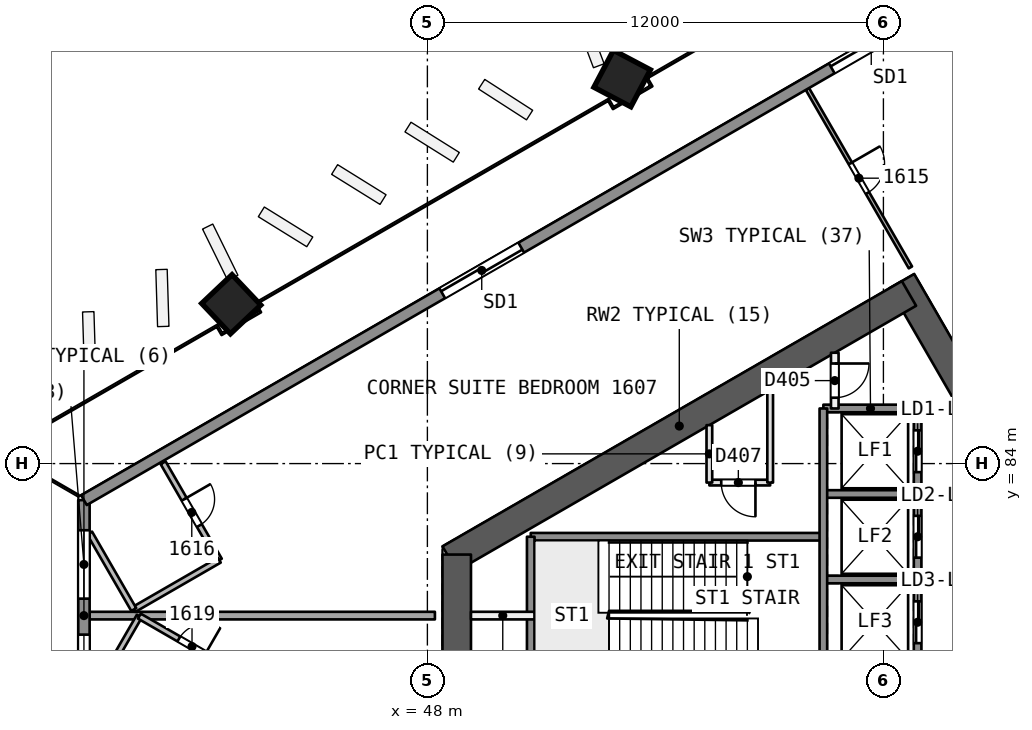
"""IFC4 building model, lengths in metres.
Left out: names, types, materials, properties, quantities, classifications, styles, units other than length and angle.
Written with IfcOpenShell. Run it as: python <this file> out.ifc"""

import sys

from ifc_helpers import new_model, si_unit, direction, frame, frame_2d, origin, origin_2d, place, context, subcontext, project, spatial, rectangle, extrude, element, fill, save


model = new_model("IFC4")
c1 = context("Model", 3, precision=1e-05, world=origin(), true_north=direction((0.0, 1.0)))
c2 = subcontext(c1, "Body", "Model", "MODEL_VIEW")
j1 = project(units=[si_unit("LENGTHUNIT", "METRE"), si_unit("PLANEANGLEUNIT", "RADIAN")], contexts=[c1])
p1 = place(None, origin())
s1 = spatial("IfcSite", under=j1, at=p1, CompositionType="ELEMENT")
p2 = place(p1, origin())
s2 = spatial("IfcBuilding", under=s1, at=p2, CompositionType="ELEMENT")
p3 = place(p2, frame((0.0, 0.0, 72.1)))
s3 = spatial("IfcBuildingStorey", under=s2, at=p3, CompositionType="ELEMENT", Elevation=72.1)
p4 = place(p3, frame((65.567, 80.0, 0.0), z_axis=(0.0, 0.0, 1.0), x_axis=(-0.499988615364, 0.866031976607, 0.0)))
e1 = element("IfcWall", 1, at=p4, inside=s3, PredefinedType="SHEAR", context=c2, shape_type="SweptSolid", body=[
    extrude(rectangle(XDim=10.163, YDim=0.75, at=frame_2d((5.082, 0.0))), origin(), (0.0, 0.0, 1.0), 3.7),
])
p5 = place(p4, frame((0.733, 0.0, 0.0)))
e2 = element("IfcOpeningElement", 2, at=p5, cuts=e1, PredefinedType="OPENING", context=c2, shape_type="SweptSolid", body=[
    extrude(rectangle(XDim=1.2, YDim=2.1, at=frame_2d((0.6, 1.05))), frame((0.0, 0.385, 0.0), z_axis=(0.0, -1.0, 0.0), x_axis=(1.0, 0.0, 0.0)), (0.0, 0.0, 1.0), 0.771),
])
p6 = place(p3, frame((60.673, 88.477, 0.0), z_axis=(0.0, 0.0, 1.0), x_axis=(-0.8660248072, -0.500001033313, 0.0)))
e3 = element("IfcWall", 3, at=p6, inside=s3, PredefinedType="SHEAR", context=c2, shape_type="SweptSolid", body=[
    extrude(rectangle(XDim=13.958, YDim=0.75, at=frame_2d((6.979, 0.0))), origin(), (0.0, 0.0, 1.0), 3.7),
])
p7 = place(p3, frame((48.772, 81.606, 0.0), z_axis=(0.0, 0.0, 1.0), x_axis=(0.0, -1.0, 0.0)))
e4 = element("IfcWall", 4, at=p7, inside=s3, PredefinedType="SHEAR", context=c2, shape_type="SweptSolid", body=[
    extrude(rectangle(XDim=3.429, YDim=0.75, at=frame_2d((1.714, 0.0))), origin(), (0.0, 0.0, 1.0), 3.7),
])
p8 = place(p3, frame((60.673, 71.523, 0.0), z_axis=(0.0, 0.0, 1.0), x_axis=(0.499997052475, 0.866027105532, 0.0)))
e5 = element("IfcWall", 5, at=p8, inside=s3, PredefinedType="SHEAR", context=c2, shape_type="SweptSolid", body=[
    extrude(rectangle(XDim=10.005, YDim=0.75, at=frame_2d((5.002, 0.0))), origin(), (0.0, 0.0, 1.0), 3.7),
])
p9 = place(p8, frame((7.855, 0.0, 0.0)))
e6 = element("IfcOpeningElement", 6, at=p9, cuts=e5, PredefinedType="OPENING", context=c2, shape_type="SweptSolid", body=[
    extrude(rectangle(XDim=1.2, YDim=2.1, at=frame_2d((0.6, 1.05))), frame((0.0, 0.385, 0.0), z_axis=(0.0, -1.0, 0.0), x_axis=(1.0, 0.0, 0.0)), (0.0, 0.0, 1.0), 0.771),
])
p10 = place(p3, frame((53.102, 94.146, 0.0), z_axis=(0.019328516974, -0.012138044789, 0.999739504221), x_axis=(-0.500208848309, 0.865669585777, 0.020181088508)))
e7 = element("IfcColumn", 7, at=p10, inside=s3, PredefinedType="COLUMN", context=c2, shape_type="SweptSolid", body=[
    extrude(rectangle(XDim=1.1, YDim=1.1, at=origin_2d()), origin(), (0.0, 0.0, 1.0), 3.701),
])
p11 = place(p3, frame((42.804, 88.201, 0.0), z_axis=(0.02855911485, -0.006793507689, 0.999569019734), x_axis=(-0.500407643461, 0.865554709988, 0.020180049142)))
e8 = element("IfcColumn", 8, at=p11, inside=s3, PredefinedType="COLUMN", context=c2, shape_type="SweptSolid", body=[
    extrude(rectangle(XDim=1.1, YDim=1.1, at=origin_2d()), origin(), (0.0, 0.0, 1.0), 3.702),
])
p12 = place(p3, frame((61.51, 95.884, 0.0), z_axis=(0.0, 0.0, 1.0), x_axis=(0.499993171696, -0.866029346071, 0.0)))
e9 = element("IfcWall", 9, at=p12, inside=s3, PredefinedType="PARTITIONING", context=c2, shape_type="SweptSolid", body=[
    extrude(rectangle(XDim=13.401, YDim=0.2, at=frame_2d((6.701, 0.0))), origin(), (0.0, 0.0, 1.0), 3.2),
])
p13 = place(p3, frame((58.0, 93.857, 0.0), z_axis=(0.0, 0.0, 1.0), x_axis=(0.499974500895, -0.866040125199, 0.0)))
e10 = element("IfcWall", 10, at=p13, inside=s3, PredefinedType="PARTITIONING", context=c2, shape_type="SweptSolid", body=[
    extrude(rectangle(XDim=5.422, YDim=0.1, at=frame_2d((2.711, 0.0))), origin(), (0.0, 0.0, 1.0), 3.2),
])
p14 = place(p13, frame((2.261, 0.0, 0.0)))
e11 = element("IfcOpeningElement", 11, at=p14, cuts=e10, PredefinedType="OPENING", context=c2, shape_type="SweptSolid", body=[
    extrude(rectangle(XDim=0.9, YDim=2.1, at=frame_2d((0.45, 1.05))), frame((0.0, 0.061, 0.0), z_axis=(0.0, -1.0, 0.0), x_axis=(1.0, 0.0, 0.0)), (0.0, 0.0, 1.0), 0.121),
])
p15 = place(p3, frame((41.046, 84.022, 0.0), z_axis=(0.0, 0.0, 1.0), x_axis=(0.500017718492, -0.866015173767, 0.0)))
e12 = element("IfcWall", 12, at=p15, inside=s3, PredefinedType="PARTITIONING", context=c2, shape_type="SweptSolid", body=[
    extrude(rectangle(XDim=2.958, YDim=0.15, at=frame_2d((1.479, 0.0))), origin(), (0.0, 0.0, 1.0), 3.2),
])
p16 = place(p15, frame((1.108, 0.0, 0.0)))
e13 = element("IfcOpeningElement", 13, at=p16, cuts=e12, PredefinedType="OPENING", context=c2, shape_type="SweptSolid", body=[
    extrude(rectangle(XDim=0.8, YDim=2.1, at=frame_2d((0.4, 1.05))), frame((0.0, 0.085, 0.0), z_axis=(0.0, -1.0, 0.0), x_axis=(1.0, 0.0, 0.0)), (0.0, 0.0, 1.0), 0.171),
])
p17 = place(p3, frame((42.525, 81.46, 0.0), z_axis=(0.0, 0.0, 1.0), x_axis=(-0.866021400173, -0.500006934395, 0.0)))
e14 = element("IfcWall", 14, at=p17, inside=s3, PredefinedType="PARTITIONING", context=c2, shape_type="SweptSolid", body=[
    extrude(rectangle(XDim=2.6, YDim=0.15, at=frame_2d((1.3, 0.0))), origin(), (0.0, 0.0, 1.0), 3.2),
])
p18 = place(p3, frame((40.273, 80.16, 0.0), z_axis=(0.0, 0.0, 1.0), x_axis=(-0.500013365158, 0.86601768727, 0.0)))
e15 = element("IfcWall", 15, at=p18, inside=s3, PredefinedType="PARTITIONING", context=c2, shape_type="SweptSolid", body=[
    extrude(rectangle(XDim=2.325, YDim=0.15, at=frame_2d((1.162, 0.0))), origin(), (0.0, 0.0, 1.0), 3.2),
])
p19 = place(p3, frame((39.111, 80.0, 0.0), z_axis=(0.0, 0.0, 1.0), x_axis=(1.0, 0.0, 0.0)))
e16 = element("IfcWall", 16, at=p19, inside=s3, PredefinedType="PARTITIONING", context=c2, shape_type="SweptSolid", body=[
    extrude(rectangle(XDim=9.087, YDim=0.2, at=frame_2d((4.543, 0.0))), origin(), (0.0, 0.0, 1.0), 3.2),
])
p20 = place(p3, frame((39.111, 77.718, 0.0), z_axis=(0.0, 0.0, 1.0), x_axis=(0.500058625179, 0.865991553875, 0.0)))
e17 = element("IfcWall", 17, at=p20, inside=s3, PredefinedType="PARTITIONING", context=c2, shape_type="SweptSolid", body=[
    extrude(rectangle(XDim=2.619, YDim=0.15, at=frame_2d((1.31, 0.0))), origin(), (0.0, 0.0, 1.0), 3.2),
])
p21 = place(p3, frame((40.421, 79.986, 0.0), z_axis=(0.0, 0.0, 1.0), x_axis=(0.86603858612, -0.49997716683, 0.0)))
e18 = element("IfcWall", 18, at=p21, inside=s3, PredefinedType="PARTITIONING", context=c2, shape_type="SweptSolid", body=[
    extrude(rectangle(XDim=2.6, YDim=0.15, at=frame_2d((1.3, 0.0))), origin(), (0.0, 0.0, 1.0), 3.2),
])
p22 = place(p21, frame((1.2, 0.0, 0.0)))
e19 = element("IfcOpeningElement", 19, at=p22, cuts=e18, PredefinedType="OPENING", context=c2, shape_type="SweptSolid", body=[
    extrude(rectangle(XDim=0.8, YDim=2.1, at=frame_2d((0.4, 1.05))), frame((0.0, 0.085, 0.0), z_axis=(0.0, -1.0, 0.0), x_axis=(1.0, 0.0, 0.0)), (0.0, 0.0, 1.0), 0.171),
])
p23 = place(p3, frame((38.962, 76.962, 0.0), z_axis=(0.0, 0.0, 1.0), x_axis=(0.0, 1.0, 0.0)))
e20 = element("IfcWall", 20, at=p23, inside=s3, PredefinedType="SOLIDWALL", context=c2, shape_type="SweptSolid", body=[
    extrude(rectangle(XDim=6.076, YDim=0.3, at=frame_2d((3.038, 0.0))), origin(), (0.0, 0.0, 1.0), 3.2),
])
p24 = place(p23, frame((3.484, 0.0, 0.9)))
e21 = element("IfcOpeningElement", 21, at=p24, cuts=e20, PredefinedType="OPENING", context=c2, shape_type="SweptSolid", body=[
    extrude(rectangle(XDim=1.8, YDim=1.5, at=frame_2d((0.9, 0.75))), frame((0.0, 0.161, 0.0), z_axis=(0.0, -1.0, 0.0), x_axis=(1.0, 0.0, 0.0)), (0.0, 0.0, 1.0), 0.321),
])
p25 = place(p23, frame((0.738, 0.0, 0.9)))
e22 = element("IfcOpeningElement", 22, at=p25, cuts=e20, PredefinedType="OPENING", context=c2, shape_type="SweptSolid", body=[
    extrude(rectangle(XDim=1.8, YDim=1.5, at=frame_2d((0.9, 0.75))), frame((0.0, 0.161, 0.0), z_axis=(0.0, -1.0, 0.0), x_axis=(1.0, 0.0, 0.0)), (0.0, 0.0, 1.0), 0.321),
])
p26 = place(p3, frame((38.962, 83.038, 0.0), z_axis=(0.0, 0.0, 1.0), x_axis=(0.866024483997, 0.500001593116, 0.0)))
e23 = element("IfcWall", 23, at=p26, inside=s3, PredefinedType="SOLIDWALL", context=c2, shape_type="SweptSolid", body=[
    extrude(rectangle(XDim=59.381, YDim=0.3, at=frame_2d((29.69, 0.0))), origin(), (0.0, 0.0, 1.0), 3.2),
])
p27 = place(p26, frame((27.399, 0.0, 0.0)))
e24 = element("IfcOpeningElement", 24, at=p27, cuts=e23, PredefinedType="OPENING", context=c2, shape_type="SweptSolid", body=[
    extrude(rectangle(XDim=2.4, YDim=2.4, at=frame_2d((1.2, 1.2))), frame((0.0, 0.161, 0.0), z_axis=(0.0, -1.0, 0.0), x_axis=(1.0, 0.0, 0.0)), (0.0, 0.0, 1.0), 0.321),
])
p28 = place(p26, frame((22.723, 0.0, 0.0)))
e25 = element("IfcOpeningElement", 25, at=p28, cuts=e23, PredefinedType="OPENING", context=c2, shape_type="SweptSolid", body=[
    extrude(rectangle(XDim=2.4, YDim=2.4, at=frame_2d((1.2, 1.2))), frame((0.0, 0.161, 0.0), z_axis=(0.0, -1.0, 0.0), x_axis=(1.0, 0.0, 0.0)), (0.0, 0.0, 1.0), 0.321),
])
p29 = place(p26, frame((10.887, 0.0, 0.0)))
e26 = element("IfcOpeningElement", 26, at=p29, cuts=e23, PredefinedType="OPENING", context=c2, shape_type="SweptSolid", body=[
    extrude(rectangle(XDim=2.4, YDim=2.4, at=frame_2d((1.2, 1.2))), frame((0.0, 0.161, 0.0), z_axis=(0.0, -1.0, 0.0), x_axis=(1.0, 0.0, 0.0)), (0.0, 0.0, 1.0), 0.321),
])
p30 = place(p26, frame((44.158, 0.0, 0.0)))
e27 = element("IfcOpeningElement", 27, at=p30, cuts=e23, PredefinedType="OPENING", context=c2, shape_type="SweptSolid", body=[
    extrude(rectangle(XDim=2.4, YDim=2.4, at=frame_2d((1.2, 1.2))), frame((0.0, 0.161, 0.0), z_axis=(0.0, -1.0, 0.0), x_axis=(1.0, 0.0, 0.0)), (0.0, 0.0, 1.0), 0.321),
])
p31 = place(p3, frame((60.9, 85.45, 0.0), z_axis=(0.0, 0.0, 1.0), x_axis=(-1.0, 0.0, 0.0)))
e28 = element("IfcWall", 28, at=p31, inside=s3, PredefinedType="SOLIDWALL", context=c2, shape_type="SweptSolid", body=[
    extrude(rectangle(XDim=2.48, YDim=0.2, at=frame_2d((1.24, 0.0))), origin(), (0.0, 0.0, 1.0), 3.2),
])
p32 = place(p3, frame((57.02, 83.5, 0.0), z_axis=(0.0, 0.0, 1.0), x_axis=(-1.0, 0.0, 0.0)))
e29 = element("IfcWall", 29, at=p32, inside=s3, PredefinedType="PARTITIONING", context=c2, shape_type="SweptSolid", body=[
    extrude(rectangle(XDim=1.6, YDim=0.15, at=frame_2d((0.8, 0.0))), origin(), (0.0, 0.0, 1.0), 3.2),
])
p33 = place(p32, frame((0.387, 0.0, 0.0)))
e30 = element("IfcOpeningElement", 30, at=p33, cuts=e29, PredefinedType="OPENING", context=c2, shape_type="SweptSolid", body=[
    extrude(rectangle(XDim=0.9, YDim=2.1, at=frame_2d((0.45, 1.05))), frame((0.0, 0.085, 0.0), z_axis=(0.0, -1.0, 0.0), x_axis=(1.0, 0.0, 0.0)), (0.0, 0.0, 1.0), 0.171),
])
p34 = place(p3, frame((60.9, 83.2, 0.0), z_axis=(0.0, 0.0, 1.0), x_axis=(-1.0, 0.0, 0.0)))
e31 = element("IfcWall", 31, at=p34, inside=s3, PredefinedType="SOLIDWALL", context=c2, shape_type="SweptSolid", body=[
    extrude(rectangle(XDim=2.48, YDim=0.2, at=frame_2d((1.24, 0.0))), origin(), (0.0, 0.0, 1.0), 3.2),
])
p35 = place(p3, frame((58.42, 82.075, 0.0), z_axis=(0.0, 0.0, 1.0), x_axis=(-1.0, 0.0, 0.0)))
e32 = element("IfcWall", 32, at=p35, inside=s3, PredefinedType="SOLIDWALL", context=c2, shape_type="SweptSolid", body=[
    extrude(rectangle(XDim=7.7, YDim=0.2, at=frame_2d((3.85, 0.0))), origin(), (0.0, 0.0, 1.0), 3.2),
])
p36 = place(p3, frame((60.9, 80.95, 0.0), z_axis=(0.0, 0.0, 1.0), x_axis=(-1.0, 0.0, 0.0)))
e33 = element("IfcWall", 33, at=p36, inside=s3, PredefinedType="SOLIDWALL", context=c2, shape_type="SweptSolid", body=[
    extrude(rectangle(XDim=2.48, YDim=0.2, at=frame_2d((1.24, 0.0))), origin(), (0.0, 0.0, 1.0), 3.2),
])
p37 = place(p3, frame((50.82, 80.0, 0.0), z_axis=(0.0, 0.0, 1.0), x_axis=(-1.0, 0.0, 0.0)))
e34 = element("IfcWall", 34, at=p37, inside=s3, PredefinedType="PARTITIONING", context=c2, shape_type="SweptSolid", body=[
    extrude(rectangle(XDim=1.673, YDim=0.2, at=frame_2d((0.836, 0.0))), origin(), (0.0, 0.0, 1.0), 3.2),
])
p38 = place(p3, frame((60.9, 85.45, 0.0), z_axis=(0.0, 0.0, 1.0), x_axis=(0.0, -1.0, 0.0)))
e35 = element("IfcWall", 35, at=p38, inside=s3, PredefinedType="SOLIDWALL", context=c2, shape_type="SweptSolid", body=[
    extrude(rectangle(XDim=10.9, YDim=0.2, at=frame_2d((5.45, 0.0))), origin(), (0.0, 0.0, 1.0), 3.2),
])
p39 = place(p38, frame((0.575, 0.0, 0.0)))
e36 = element("IfcOpeningElement", 36, at=p39, cuts=e35, PredefinedType="OPENING", context=c2, shape_type="SweptSolid", body=[
    extrude(rectangle(XDim=1.1, YDim=2.1, at=frame_2d((0.55, 1.05))), frame((0.0, 0.11, 0.0), z_axis=(0.0, -1.0, 0.0), x_axis=(1.0, 0.0, 0.0)), (0.0, 0.0, 1.0), 0.221),
])
p40 = place(p38, frame((2.825, 0.0, 0.0)))
e37 = element("IfcOpeningElement", 37, at=p40, cuts=e35, PredefinedType="OPENING", context=c2, shape_type="SweptSolid", body=[
    extrude(rectangle(XDim=1.1, YDim=2.1, at=frame_2d((0.55, 1.05))), frame((0.0, 0.11, 0.0), z_axis=(0.0, -1.0, 0.0), x_axis=(1.0, 0.0, 0.0)), (0.0, 0.0, 1.0), 0.221),
])
p41 = place(p38, frame((5.075, 0.0, 0.0)))
e38 = element("IfcOpeningElement", 38, at=p41, cuts=e35, PredefinedType="OPENING", context=c2, shape_type="SweptSolid", body=[
    extrude(rectangle(XDim=1.1, YDim=2.1, at=frame_2d((0.55, 1.05))), frame((0.0, 0.11, 0.0), z_axis=(0.0, -1.0, 0.0), x_axis=(1.0, 0.0, 0.0)), (0.0, 0.0, 1.0), 0.221),
])
p42 = place(p38, frame((7.325, 0.0, 0.0)))
e39 = element("IfcOpeningElement", 39, at=p42, cuts=e35, PredefinedType="OPENING", context=c2, shape_type="SweptSolid", body=[
    extrude(rectangle(XDim=1.1, YDim=2.1, at=frame_2d((0.55, 1.05))), frame((0.0, 0.11, 0.0), z_axis=(0.0, -1.0, 0.0), x_axis=(1.0, 0.0, 0.0)), (0.0, 0.0, 1.0), 0.221),
])
p43 = place(p3, frame((58.72, 86.917, 0.0), z_axis=(0.0, 0.0, 1.0), x_axis=(0.0, -1.0, 0.0)))
e40 = element("IfcWall", 40, at=p43, inside=s3, PredefinedType="PARTITIONING", context=c2, shape_type="SweptSolid", body=[
    extrude(rectangle(XDim=1.467, YDim=0.2, at=frame_2d((0.733, 0.0))), origin(), (0.0, 0.0, 1.0), 3.2),
])
p44 = place(p43, frame((0.283, 0.0, 0.0)))
e41 = element("IfcOpeningElement", 41, at=p44, cuts=e40, PredefinedType="OPENING", context=c2, shape_type="SweptSolid", body=[
    extrude(rectangle(XDim=0.9, YDim=2.1, at=frame_2d((0.45, 1.05))), frame((0.0, 0.11, 0.0), z_axis=(0.0, -1.0, 0.0), x_axis=(1.0, 0.0, 0.0)), (0.0, 0.0, 1.0), 0.221),
])
p45 = place(p3, frame((58.42, 85.45, 0.0), z_axis=(0.0, 0.0, 1.0), x_axis=(0.0, -1.0, 0.0)))
e42 = element("IfcWall", 42, at=p45, inside=s3, PredefinedType="SOLIDWALL", context=c2, shape_type="SweptSolid", body=[
    extrude(rectangle(XDim=9.0, YDim=0.2, at=frame_2d((4.5, 0.0))), origin(), (0.0, 0.0, 1.0), 3.2),
])
p46 = place(p3, frame((57.02, 85.935, 0.0), z_axis=(0.0, 0.0, 1.0), x_axis=(0.0, -1.0, 0.0)))
e43 = element("IfcWall", 43, at=p46, inside=s3, PredefinedType="PARTITIONING", context=c2, shape_type="SweptSolid", body=[
    extrude(rectangle(XDim=2.435, YDim=0.15, at=frame_2d((1.218, 0.0))), origin(), (0.0, 0.0, 1.0), 3.2),
])
p47 = place(p3, frame((55.42, 85.011, 0.0), z_axis=(0.0, 0.0, 1.0), x_axis=(0.0, -1.0, 0.0)))
e44 = element("IfcWall", 44, at=p47, inside=s3, PredefinedType="PARTITIONING", context=c2, shape_type="SweptSolid", body=[
    extrude(rectangle(XDim=1.511, YDim=0.15, at=frame_2d((0.756, 0.0))), origin(), (0.0, 0.0, 1.0), 3.2),
])
p48 = place(p3, frame((50.72, 82.075, 0.0), z_axis=(0.0, 0.0, 1.0), x_axis=(0.0, -1.0, 0.0)))
e45 = element("IfcWall", 45, at=p48, inside=s3, PredefinedType="SOLIDWALL", context=c2, shape_type="SweptSolid", body=[
    extrude(rectangle(XDim=4.15, YDim=0.2, at=frame_2d((2.075, 0.0))), origin(), (0.0, 0.0, 1.0), 3.2),
])
p49 = place(p14, origin())
e46 = element("IfcDoor", 46, at=p49, inside=s3, OperationType="SINGLE_SWING_LEFT", PredefinedType="NOTDEFINED", context=c2, shape_type="SweptSolid", body=[
    extrude(rectangle(XDim=0.9, YDim=2.1, at=frame_2d((0.45, 1.05))), frame((0.0, 0.025, 0.0), z_axis=(0.0, -1.0, 0.0), x_axis=(1.0, 0.0, 0.0)), (0.0, 0.0, 1.0), 0.05),
])
fill(e11, e46)
p50 = place(p16, origin())
e47 = element("IfcDoor", 47, at=p50, inside=s3, OperationType="SINGLE_SWING_LEFT", PredefinedType="NOTDEFINED", context=c2, shape_type="SweptSolid", body=[
    extrude(rectangle(XDim=0.8, YDim=2.1, at=frame_2d((0.4, 1.05))), frame((0.0, 0.025, 0.0), z_axis=(0.0, -1.0, 0.0), x_axis=(1.0, 0.0, 0.0)), (0.0, 0.0, 1.0), 0.05),
])
fill(e13, e47)
p51 = place(p22, origin())
e48 = element("IfcDoor", 48, at=p51, inside=s3, OperationType="SINGLE_SWING_RIGHT", PredefinedType="NOTDEFINED", context=c2, shape_type="SweptSolid", body=[
    extrude(rectangle(XDim=0.8, YDim=2.1, at=frame_2d((0.4, 1.05))), frame((0.0, 0.025, 0.0), z_axis=(0.0, -1.0, 0.0), x_axis=(1.0, 0.0, 0.0)), (0.0, 0.0, 1.0), 0.05),
])
fill(e19, e48)
p52 = place(p24, origin())
e49 = element("IfcWindow", 49, at=p52, inside=s3, PartitioningType="SINGLE_PANEL", PredefinedType="WINDOW", context=c2, shape_type="SweptSolid", body=[
    extrude(rectangle(XDim=1.8, YDim=1.5, at=frame_2d((0.9, 0.75))), frame((0.0, 0.03, 0.0), z_axis=(0.0, -1.0, 0.0), x_axis=(1.0, 0.0, 0.0)), (0.0, 0.0, 1.0), 0.06),
])
fill(e21, e49)
p53 = place(p25, origin())
e50 = element("IfcWindow", 50, at=p53, inside=s3, PartitioningType="SINGLE_PANEL", PredefinedType="WINDOW", context=c2, shape_type="SweptSolid", body=[
    extrude(rectangle(XDim=1.8, YDim=1.5, at=frame_2d((0.9, 0.75))), frame((0.0, 0.03, 0.0), z_axis=(0.0, -1.0, 0.0), x_axis=(1.0, 0.0, 0.0)), (0.0, 0.0, 1.0), 0.06),
])
fill(e22, e50)
p54 = place(p28, origin())
e51 = element("IfcDoor", 51, at=p54, inside=s3, OperationType="SLIDING_TO_RIGHT", PredefinedType="NOTDEFINED", context=c2, shape_type="SweptSolid", body=[
    extrude(rectangle(XDim=2.4, YDim=2.4, at=frame_2d((1.2, 1.2))), frame((0.0, 0.025, 0.0), z_axis=(0.0, -1.0, 0.0), x_axis=(1.0, 0.0, 0.0)), (0.0, 0.0, 1.0), 0.05),
])
fill(e25, e51)
p55 = place(p29, origin())
e52 = element("IfcDoor", 52, at=p55, inside=s3, OperationType="SLIDING_TO_LEFT", PredefinedType="NOTDEFINED", context=c2, shape_type="SweptSolid", body=[
    extrude(rectangle(XDim=2.4, YDim=2.4, at=frame_2d((1.2, 1.2))), frame((0.0, 0.025, 0.0), z_axis=(0.0, -1.0, 0.0), x_axis=(1.0, 0.0, 0.0)), (0.0, 0.0, 1.0), 0.05),
])
fill(e26, e52)
p56 = place(p39, origin())
e53 = element("IfcDoor", 53, at=p56, inside=s3, OperationType="SLIDING_TO_RIGHT", PredefinedType="NOTDEFINED", context=c2, shape_type="SweptSolid", body=[
    extrude(rectangle(XDim=1.1, YDim=2.1, at=frame_2d((0.55, 1.05))), frame((0.0, 0.025, 0.0), z_axis=(0.0, -1.0, 0.0), x_axis=(1.0, 0.0, 0.0)), (0.0, 0.0, 1.0), 0.05),
])
fill(e36, e53)
p57 = place(p40, origin())
e54 = element("IfcDoor", 54, at=p57, inside=s3, OperationType="SLIDING_TO_LEFT", PredefinedType="NOTDEFINED", context=c2, shape_type="SweptSolid", body=[
    extrude(rectangle(XDim=1.1, YDim=2.1, at=frame_2d((0.55, 1.05))), frame((0.0, 0.025, 0.0), z_axis=(0.0, -1.0, 0.0), x_axis=(1.0, 0.0, 0.0)), (0.0, 0.0, 1.0), 0.05),
])
fill(e37, e54)
p58 = place(p41, origin())
e55 = element("IfcDoor", 55, at=p58, inside=s3, OperationType="SLIDING_TO_RIGHT", PredefinedType="NOTDEFINED", context=c2, shape_type="SweptSolid", body=[
    extrude(rectangle(XDim=1.1, YDim=2.1, at=frame_2d((0.55, 1.05))), frame((0.0, 0.025, 0.0), z_axis=(0.0, -1.0, 0.0), x_axis=(1.0, 0.0, 0.0)), (0.0, 0.0, 1.0), 0.05),
])
fill(e38, e55)
p59 = place(p44, origin())
e56 = element("IfcDoor", 56, at=p59, inside=s3, OperationType="SINGLE_SWING_LEFT", PredefinedType="NOTDEFINED", context=c2, shape_type="SweptSolid", body=[
    extrude(rectangle(XDim=0.9, YDim=2.1, at=frame_2d((0.45, 1.05))), frame((0.0, 0.025, 0.0), z_axis=(0.0, -1.0, 0.0), x_axis=(1.0, 0.0, 0.0)), (0.0, 0.0, 1.0), 0.05),
])
fill(e41, e56)
p60 = place(p33, origin())
e57 = element("IfcDoor", 57, at=p60, inside=s3, OperationType="SINGLE_SWING_LEFT", PredefinedType="NOTDEFINED", context=c2, shape_type="SweptSolid", body=[
    extrude(rectangle(XDim=0.9, YDim=2.1, at=frame_2d((0.45, 1.05))), frame((0.0, 0.025, 0.0), z_axis=(0.0, -1.0, 0.0), x_axis=(1.0, 0.0, 0.0)), (0.0, 0.0, 1.0), 0.05),
])
fill(e30, e57)
save(model, sys.argv[1])
